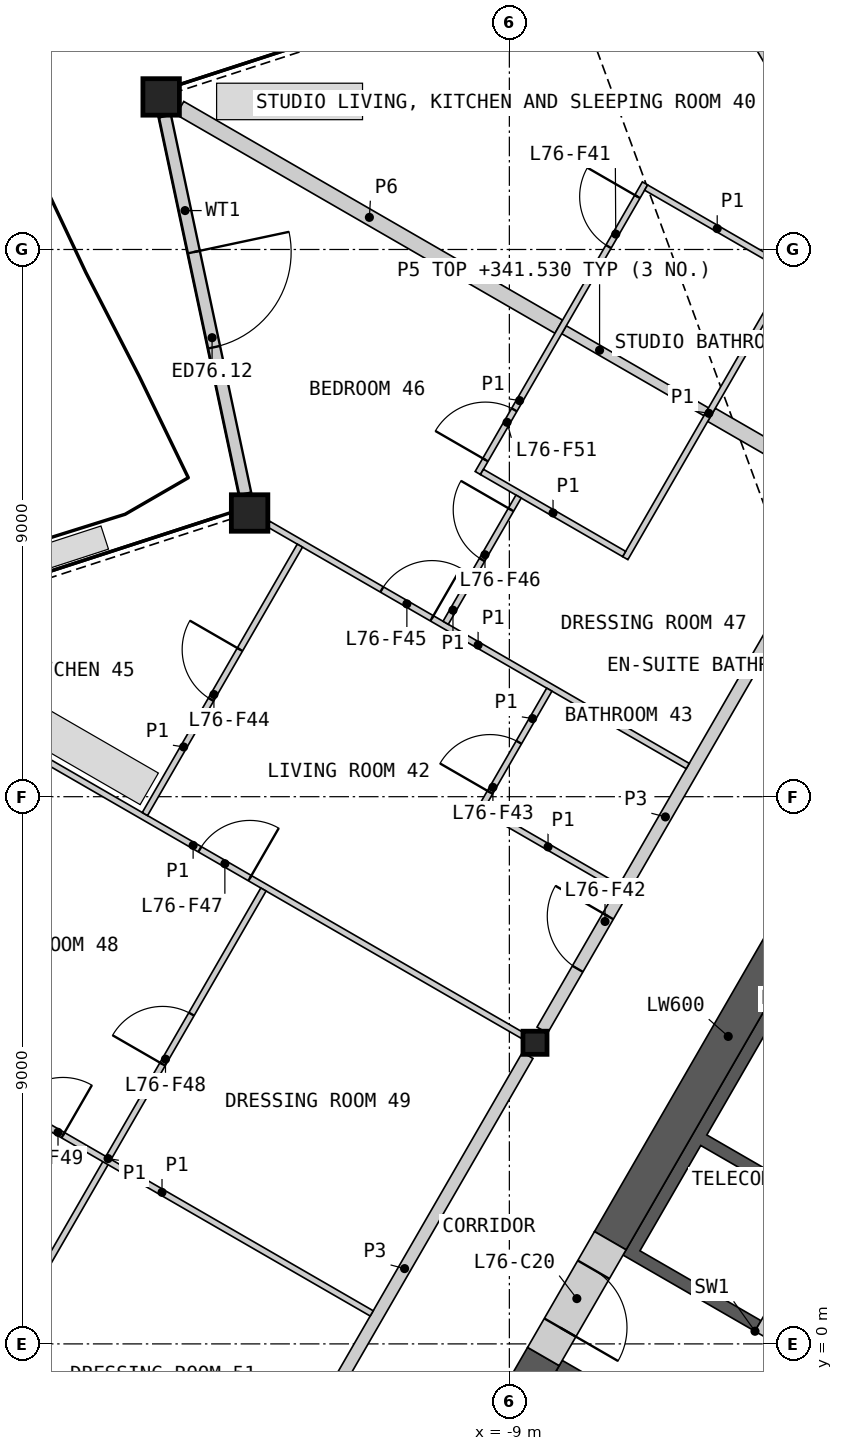
"""IFC4 building model, lengths in metres.
Left out: names, types, materials, properties, quantities, classifications, styles, units other than length and angle.
Written with IfcOpenShell. Run it as: python <this file> out.ifc"""

import sys

from ifc_helpers import new_model, si_unit, direction, frame, frame_2d, origin, origin_2d, place, context, subcontext, project, spatial, polyline, rectangle, hollow_rectangle, i_section, outline, extrude, element, fill, save


model = new_model("IFC4")
c1 = context("Model", 3, precision=1e-05, world=origin(), true_north=direction((0.0, 1.0)))
c2 = subcontext(c1, "Body", "Model", "MODEL_VIEW")
j1 = project(units=[si_unit("LENGTHUNIT", "METRE"), si_unit("PLANEANGLEUNIT", "RADIAN")], contexts=[c1])
p1 = place(None, origin())
s1 = spatial("IfcSite", under=j1, at=p1, CompositionType="ELEMENT")
p2 = place(p1, origin())
s2 = spatial("IfcBuilding", under=s1, at=p2, CompositionType="ELEMENT")
p3 = place(p2, frame((0.0, 0.0, 339.2)))
s3 = spatial("IfcBuildingStorey", under=s2, at=p3, CompositionType="ELEMENT", Elevation=339.2)
for number, where, z_axis, x_axis in (
    (1, (-14.727, 20.509, 0.0), (0.0, 0.0, 1.0), (1.0, 0.0, 0.0)),
    (2, (-13.272, 13.666, 0.0), (0.0, 0.0, 1.0), (1.0, 0.0, 0.0)),
):
    element("IfcColumn", number, at=place(p3, frame(where, z_axis=z_axis, x_axis=x_axis)), inside=s3, PredefinedType="COLUMN", context=c2, shape_type="SweptSolid", body=[
        extrude(hollow_rectangle(XDim=0.6, YDim=0.6, WallThickness=0.04, at=origin_2d()), origin(), (0.0, 0.0, 1.0), 3.4),
    ])
p4 = place(p3, frame((-8.578, 4.953, 0.0), z_axis=(0.0, 0.0, 1.0), x_axis=(1.0, 0.0, 0.0)))
e3 = element("IfcColumn", 3, at=p4, inside=s3, PredefinedType="COLUMN", context=c2, shape_type="SweptSolid", body=[
    extrude(i_section(OverallWidth=0.396, OverallDepth=0.381, WebThickness=0.019, FlangeThickness=0.03, at=origin_2d()), origin(), (0.0, 0.0, 1.0), 3.4),
])
p5 = place(p3, frame((-14.663, 20.192, 0.0), z_axis=(0.0, 0.0, 1.0), x_axis=(0.207897850695, -0.97815054244, 0.0)))
e4 = element("IfcWall", 4, at=p5, inside=s3, PredefinedType="SOLIDWALL", context=c2, shape_type="SweptSolid", body=[
    extrude(rectangle(XDim=6.348, YDim=0.2, at=frame_2d((3.174, 0.0))), origin(), (0.0, 0.0, 1.0), 2.488),
])
p6 = place(p5, frame((2.285, 0.0, 0.0)))
e5 = element("IfcOpeningElement", 5, at=p6, cuts=e4, PredefinedType="OPENING", context=c2, shape_type="SweptSolid", body=[
    extrude(rectangle(XDim=1.6, YDim=2.25, at=frame_2d((0.8, 1.125))), frame((0.0, 0.11, 0.0), z_axis=(0.0, -1.0, 0.0), x_axis=(1.0, 0.0, 0.0)), (0.0, 0.0, 1.0), 0.22),
])
p7 = place(p3, origin())
e6 = element("IfcWall", 6, at=p7, inside=s3, PredefinedType="SHEAR", context=c2, shape_type="SweptSolid", body=[
    extrude(outline(polyline([(-6.061, -1.697), (-8.231, -0.444), (-8.131, -0.271), (-5.96, -1.524), (-6.061, -1.697)])), origin(), (0.0, 0.0, 1.0), 3.1),
])
p8 = place(p3, origin())
e7 = element("IfcWall", 7, at=p8, inside=s3, PredefinedType="SHEAR", context=c2, shape_type="SweptSolid", body=[
    extrude(outline(polyline([(-4.96, 0.208), (-7.131, 1.461), (-3.731, 7.35), (-1.561, 6.097), (-1.66, 5.924), (-3.652, 7.074), (-5.752, 3.437), (-3.76, 2.287), (-3.861, 2.113), (-5.852, 3.263), (-6.852, 1.531), (-4.861, 0.381), (-4.96, 0.208)])), origin(), (0.0, 0.0, 1.0), 3.1),
])
p9 = place(p3, frame((-1.631, 5.776, 0.0), z_axis=(0.0, 0.0, 1.0), x_axis=(-0.499992876559, -0.866029516466, 0.0)))
e8 = element("IfcWall", 8, at=p9, inside=s3, PredefinedType="SOLIDWALL", context=c2, shape_type="SweptSolid", body=[
    extrude(rectangle(XDim=6.486, YDim=0.2, at=frame_2d((3.243, 0.0))), origin(), (0.0, 0.0, 1.0), 3.1),
])
p10 = place(p9, frame((1.537, 0.0, 0.0)))
e9 = element("IfcOpeningElement", 9, at=p10, cuts=e8, PredefinedType="OPENING", context=c2, shape_type="SweptSolid", body=[
    extrude(rectangle(XDim=0.9, YDim=2.1, at=frame_2d((0.45, 1.05))), frame((0.0, 0.11, 0.0), z_axis=(0.0, -1.0, 0.0), x_axis=(1.0, 0.0, 0.0)), (0.0, 0.0, 1.0), 0.22),
])
p11 = place(p9, frame((4.837, 0.0, 0.0)))
e10 = element("IfcOpeningElement", 10, at=p11, cuts=e8, PredefinedType="OPENING", context=c2, shape_type="SweptSolid", body=[
    extrude(rectangle(XDim=0.9, YDim=2.1, at=frame_2d((0.45, 1.05))), frame((0.0, 0.11, 0.0), z_axis=(0.0, -1.0, 0.0), x_axis=(1.0, 0.0, 0.0)), (0.0, 0.0, 1.0), 0.22),
])
p12 = place(p3, frame((-3.461, 8.417, 0.0), z_axis=(0.0, 0.0, 1.0), x_axis=(-0.50000391502, -0.866023143435, 0.0)))
e11 = element("IfcWall", 11, at=p12, inside=s3, PredefinedType="SHEAR", context=c2, shape_type="SweptSolid", body=[
    extrude(rectangle(XDim=7.759, YDim=0.6, at=frame_2d((3.879, 0.0))), origin(), (0.0, 0.0, 1.0), 3.1),
])
p13 = place(p3, frame((-8.44, -0.208, 0.0), z_axis=(0.0, 0.0, 1.0), x_axis=(-0.500007425856, -0.866021116422, 0.0)))
e12 = element("IfcWall", 12, at=p13, inside=s3, PredefinedType="SHEAR", context=c2, shape_type="SweptSolid", body=[
    extrude(rectangle(XDim=4.969, YDim=0.6, at=frame_2d((2.484, 0.0))), origin(), (0.0, 0.0, 1.0), 3.1),
])
p14 = place(p3, frame((-7.34, 1.698, 0.0), z_axis=(0.0, 0.0, 1.0), x_axis=(-0.50002983664, -0.866008176907, 0.0)))
e13 = element("IfcWall", 13, at=p14, inside=s3, PredefinedType="SHEAR", context=c2, shape_type="SweptSolid", body=[
    extrude(rectangle(XDim=2.2, YDim=0.6, at=frame_2d((1.1, 0.0))), origin(), (0.0, 0.0, 1.0), 3.1),
])
p15 = place(p14, frame((0.55, 0.0, 0.0)))
e14 = element("IfcOpeningElement", 14, at=p15, cuts=e13, PredefinedType="OPENING", context=c2, shape_type="SweptSolid", body=[
    extrude(rectangle(XDim=1.1, YDim=2.1, at=frame_2d((0.55, 1.05))), frame((0.0, 0.31, 0.0), z_axis=(0.0, -1.0, 0.0), x_axis=(1.0, 0.0, 0.0)), (0.0, 0.0, 1.0), 0.62),
])
p16 = place(p3, frame((-24.815, 2.323, 0.0), z_axis=(0.0, 0.0, 1.0), x_axis=(0.866033203648, -0.499986489997, 0.0)))
e15 = element("IfcWall", 15, at=p16, inside=s3, PredefinedType="PARTITIONING", context=c2, shape_type="SweptSolid", body=[
    extrude(rectangle(XDim=12.646, YDim=0.25, at=frame_2d((6.323, 0.0))), origin(), (0.0, 0.0, 1.0), 2.33),
])
p17 = place(p3, frame((-8.458, 5.16, 0.0), z_axis=(0.0, 0.0, 1.0), x_axis=(0.499984266882, 0.866034487114, 0.0)))
e16 = element("IfcWall", 16, at=p17, inside=s3, PredefinedType="PARTITIONING", context=c2, shape_type="SweptSolid", body=[
    extrude(rectangle(XDim=8.099, YDim=0.2, at=frame_2d((4.049, 0.0))), origin(), (0.0, 0.0, 1.0), 3.1),
])
p18 = place(p17, frame((1.164, 0.0, 0.0)))
e17 = element("IfcOpeningElement", 17, at=p18, cuts=e16, PredefinedType="OPENING", context=c2, shape_type="SweptSolid", body=[
    extrude(rectangle(XDim=1.0, YDim=2.1, at=frame_2d((0.5, 1.05))), frame((0.0, 0.11, 0.0), z_axis=(0.0, -1.0, 0.0), x_axis=(1.0, 0.0, 0.0)), (0.0, 0.0, 1.0), 0.22),
])
p19 = place(p3, frame((-12.748, -2.269, 0.0), z_axis=(0.0, 0.0, 1.0), x_axis=(0.499984266882, 0.866034487114, 0.0)))
e18 = element("IfcWall", 18, at=p19, inside=s3, PredefinedType="PARTITIONING", context=c2, shape_type="SweptSolid", body=[
    extrude(rectangle(XDim=8.099, YDim=0.2, at=frame_2d((4.049, 0.0))), origin(), (0.0, 0.0, 1.0), 3.1),
])
p20 = place(p3, frame((-14.417, 20.327, 0.0), z_axis=(0.0, 0.0, 1.0), x_axis=(0.866018271907, -0.50001235257, 0.0)))
e19 = element("IfcWall", 19, at=p20, inside=s3, PredefinedType="PARTITIONING", context=c2, shape_type="SweptSolid", body=[
    extrude(rectangle(XDim=7.193, YDim=0.25, at=frame_2d((3.596, 0.0))), origin(), (0.0, 0.0, 1.0), 2.33),
])
p21 = place(p3, frame((-5.676, 15.28, 0.0), z_axis=(0.0, 0.0, 1.0), x_axis=(0.865989465428, -0.500062241894, 0.0)))
e20 = element("IfcWall", 20, at=p21, inside=s3, PredefinedType="PARTITIONING", context=c2, shape_type="SweptSolid", body=[
    extrude(rectangle(XDim=2.55, YDim=0.25, at=frame_2d((1.275, 0.0))), origin(), (0.0, 0.0, 1.0), 2.33),
])
p22 = place(p3, frame((-9.292, 28.919, 0.0), z_axis=(0.0, 0.0, 1.0), x_axis=(0.505558038556, -0.862792599442, 0.0)))
e21 = element("IfcWall", 21, at=p22, inside=s3, PredefinedType="PARTITIONING", context=c2, shape_type="SweptSolid", body=[
    extrude(rectangle(XDim=14.397, YDim=0.2, at=frame_2d((7.199, 0.0))), origin(), (0.0, 0.0, 1.0), 2.33),
])
p23 = place(p3, frame((-8.101, 16.68, 0.0), z_axis=(0.0, 0.0, 1.0), x_axis=(0.866019956843, -0.50000943426, 0.0)))
e22 = element("IfcWall", 22, at=p23, inside=s3, PredefinedType="PLUMBINGWALL", context=c2, shape_type="SweptSolid", body=[
    extrude(rectangle(XDim=2.7, YDim=0.15, at=frame_2d((1.35, 0.0))), origin(), (0.0, 0.0, 1.0), 2.33),
])
p24 = place(p3, frame((-19.615, 11.325, 0.0), z_axis=(0.0, 0.0, 1.0), x_axis=(0.86602139559, -0.500006942333, 0.0)))
e23 = element("IfcWall", 23, at=p24, inside=s3, PredefinedType="PARTITIONING", context=c2, shape_type="SweptSolid", body=[
    extrude(rectangle(XDim=12.505, YDim=0.1, at=frame_2d((6.252, 0.0))), origin(), (0.0, 0.0, 1.0), 2.33),
])
p25 = place(p24, frame((6.38, 0.0, 0.0)))
e24 = element("IfcOpeningElement", 24, at=p25, cuts=e23, PredefinedType="OPENING", context=c2, shape_type="SweptSolid", body=[
    extrude(rectangle(XDim=0.95, YDim=2.1, at=frame_2d((0.475, 1.05))), frame((0.0, 0.06, 0.0), z_axis=(0.0, -1.0, 0.0), x_axis=(1.0, 0.0, 0.0)), (0.0, 0.0, 1.0), 0.12),
])
p26 = place(p3, frame((-18.154, -1.377, 0.0), z_axis=(0.0, 0.0, 1.0), x_axis=(0.49998782916, 0.866032430508, 0.0)))
e25 = element("IfcWall", 25, at=p26, inside=s3, PredefinedType="PARTITIONING", context=c2, shape_type="SweptSolid", body=[
    extrude(rectangle(XDim=10.22, YDim=0.1, at=frame_2d((5.11, 0.0))), origin(), (0.0, 0.0, 1.0), 2.33),
])
p27 = place(p26, frame((6.903, 0.0, 0.0)))
e26 = element("IfcOpeningElement", 26, at=p27, cuts=e25, PredefinedType="OPENING", context=c2, shape_type="SweptSolid", body=[
    extrude(rectangle(XDim=0.95, YDim=2.1, at=frame_2d((0.475, 1.05))), frame((0.0, 0.06, 0.0), z_axis=(0.0, -1.0, 0.0), x_axis=(1.0, 0.0, 0.0)), (0.0, 0.0, 1.0), 0.12),
])
p28 = place(p26, frame((0.552, 0.0, 0.0)))
e27 = element("IfcOpeningElement", 27, at=p28, cuts=e25, PredefinedType="OPENING", context=c2, shape_type="SweptSolid", body=[
    extrude(rectangle(XDim=0.95, YDim=2.1, at=frame_2d((0.475, 1.05))), frame((0.0, 0.06, 0.0), z_axis=(0.0, -1.0, 0.0), x_axis=(1.0, 0.0, 0.0)), (0.0, 0.0, 1.0), 0.12),
])
p29 = place(p3, frame((-18.161, 4.484, 0.0), z_axis=(0.0, 0.0, 1.0), x_axis=(0.86602732995, -0.499996663769, 0.0)))
e28 = element("IfcWall", 28, at=p29, inside=s3, PredefinedType="PARTITIONING", context=c2, shape_type="SweptSolid", body=[
    extrude(rectangle(XDim=7.964, YDim=0.1, at=frame_2d((3.982, 0.0))), origin(), (0.0, 0.0, 1.0), 2.33),
])
p30 = place(p29, frame((1.152, 0.0, 0.0)))
e29 = element("IfcOpeningElement", 29, at=p30, cuts=e28, PredefinedType="OPENING", context=c2, shape_type="SweptSolid", body=[
    extrude(rectangle(XDim=0.95, YDim=2.1, at=frame_2d((0.475, 1.05))), frame((0.0, 0.06, 0.0), z_axis=(0.0, -1.0, 0.0), x_axis=(1.0, 0.0, 0.0)), (0.0, 0.0, 1.0), 0.12),
])
p31 = place(p3, frame((-12.962, 13.485, 0.0), z_axis=(0.0, 0.0, 1.0), x_axis=(0.866021168401, -0.500007335828, 0.0)))
e30 = element("IfcWall", 30, at=p31, inside=s3, PredefinedType="PARTITIONING", context=c2, shape_type="SweptSolid", body=[
    extrude(rectangle(XDim=7.962, YDim=0.1, at=frame_2d((3.981, 0.0))), origin(), (0.0, 0.0, 1.0), 2.33),
])
p32 = place(p31, frame((2.154, 0.0, 0.0)))
e31 = element("IfcOpeningElement", 31, at=p32, cuts=e30, PredefinedType="OPENING", context=c2, shape_type="SweptSolid", body=[
    extrude(rectangle(XDim=0.95, YDim=2.1, at=frame_2d((0.475, 1.05))), frame((0.0, 0.06, 0.0), z_axis=(0.0, -1.0, 0.0), x_axis=(1.0, 0.0, 0.0)), (0.0, 0.0, 1.0), 0.12),
])
p33 = place(p3, frame((-7.094, 12.924, 0.0), z_axis=(0.0, 0.0, 1.0), x_axis=(0.499996545922, 0.866027397988, 0.0)))
e32 = element("IfcWall", 32, at=p33, inside=s3, PredefinedType="PARTITIONING", context=c2, shape_type="SweptSolid", body=[
    extrude(rectangle(XDim=5.5, YDim=0.1, at=frame_2d((2.75, 0.0))), origin(), (0.0, 0.0, 1.0), 2.33),
])
p34 = place(p3, frame((-9.519, 14.323, 0.0), z_axis=(0.0, 0.0, 1.0), x_axis=(0.499996545922, 0.866027397988, 0.0)))
e33 = element("IfcWall", 33, at=p34, inside=s3, PredefinedType="PARTITIONING", context=c2, shape_type="SweptSolid", body=[
    extrude(rectangle(XDim=5.5, YDim=0.1, at=frame_2d((2.75, 0.0))), origin(), (0.0, 0.0, 1.0), 2.33),
])
p35 = place(p34, frame((4.3, 0.0, 0.0)))
e34 = element("IfcOpeningElement", 34, at=p35, cuts=e33, PredefinedType="OPENING", context=c2, shape_type="SweptSolid", body=[
    extrude(rectangle(XDim=0.95, YDim=2.1, at=frame_2d((0.475, 1.05))), frame((0.0, 0.06, 0.0), z_axis=(0.0, -1.0, 0.0), x_axis=(1.0, 0.0, 0.0)), (0.0, 0.0, 1.0), 0.12),
])
p36 = place(p34, frame((0.25, 0.0, 0.0)))
e35 = element("IfcOpeningElement", 35, at=p36, cuts=e33, PredefinedType="OPENING", context=c2, shape_type="SweptSolid", body=[
    extrude(rectangle(XDim=0.95, YDim=2.1, at=frame_2d((0.475, 1.05))), frame((0.0, 0.06, 0.0), z_axis=(0.0, -1.0, 0.0), x_axis=(1.0, 0.0, 0.0)), (0.0, 0.0, 1.0), 0.12),
])
p37 = place(p3, frame((-14.994, 8.714, 0.0), z_axis=(0.0, 0.0, 1.0), x_axis=(0.500012659481, 0.866018094706, 0.0)))
e36 = element("IfcWall", 36, at=p37, inside=s3, PredefinedType="PARTITIONING", context=c2, shape_type="SweptSolid", body=[
    extrude(rectangle(XDim=5.097, YDim=0.1, at=frame_2d((2.549, 0.0))), origin(), (0.0, 0.0, 1.0), 2.33),
])
p38 = place(p37, frame((2.175, 0.0, 0.0)))
e37 = element("IfcOpeningElement", 37, at=p38, cuts=e36, PredefinedType="OPENING", context=c2, shape_type="SweptSolid", body=[
    extrude(rectangle(XDim=0.95, YDim=2.1, at=frame_2d((0.475, 1.05))), frame((0.0, 0.06, 0.0), z_axis=(0.0, -1.0, 0.0), x_axis=(1.0, 0.0, 0.0)), (0.0, 0.0, 1.0), 0.12),
])
for number, where, z_axis, x_axis in (
    (38, (-9.451, 14.342, 0.0), (0.0, 0.0, 1.0), (0.866, -0.5, 0.0)),
    (39, (-6.751, 19.018, 0.0), (0.0, 0.0, 1.0), (0.866, -0.5, 0.0)),
):
    element("IfcWall", number, at=place(p3, frame(where, z_axis=z_axis, x_axis=x_axis)), inside=s3, PredefinedType="PARTITIONING", context=c2, shape_type="SweptSolid", body=[
        extrude(rectangle(XDim=2.7, YDim=0.1, at=frame_2d((1.35, 0.0))), origin(), (0.0, 0.0, 1.0), 2.33),
    ])
p39 = place(p3, frame((-9.511, 8.837, 0.0), z_axis=(0.0, 0.0, 1.0), x_axis=(0.866029095148, -0.499993606316, 0.0)))
e40 = element("IfcWall", 40, at=p39, inside=s3, PredefinedType="PARTITIONING", context=c2, shape_type="SweptSolid", body=[
    extrude(rectangle(XDim=2.65, YDim=0.1, at=frame_2d((1.325, 0.0))), origin(), (0.0, 0.0, 1.0), 2.33),
])
p40 = place(p3, frame((-10.047, 11.86, 0.0), z_axis=(0.0, 0.0, 1.0), x_axis=(0.500092661743, 0.865971898892, 0.0)))
e41 = element("IfcWall", 41, at=p40, inside=s3, PredefinedType="PARTITIONING", context=c2, shape_type="SweptSolid", body=[
    extrude(rectangle(XDim=2.397, YDim=0.1, at=frame_2d((1.199, 0.0))), origin(), (0.0, 0.0, 1.0), 2.33),
])
p41 = place(p40, frame((1.198, 0.0, 0.0)))
e42 = element("IfcOpeningElement", 42, at=p41, cuts=e41, PredefinedType="OPENING", context=c2, shape_type="SweptSolid", body=[
    extrude(rectangle(XDim=0.95, YDim=2.1, at=frame_2d((0.475, 1.05))), frame((0.0, 0.06, 0.0), z_axis=(0.0, -1.0, 0.0), x_axis=(1.0, 0.0, 0.0)), (0.0, 0.0, 1.0), 0.12),
])
p42 = place(p3, frame((-9.443, 8.855, 0.0), z_axis=(0.0, 0.0, 1.0), x_axis=(0.50002983664, 0.866008176907, 0.0)))
e43 = element("IfcWall", 43, at=p42, inside=s3, PredefinedType="PARTITIONING", context=c2, shape_type="SweptSolid", body=[
    extrude(rectangle(XDim=2.2, YDim=0.1, at=frame_2d((1.1, 0.0))), origin(), (0.0, 0.0, 1.0), 2.33),
])
p43 = place(p42, frame((0.25, 0.0, 0.0)))
e44 = element("IfcOpeningElement", 44, at=p43, cuts=e43, PredefinedType="OPENING", context=c2, shape_type="SweptSolid", body=[
    extrude(rectangle(XDim=0.95, YDim=2.1, at=frame_2d((0.475, 1.05))), frame((0.0, 0.06, 0.0), z_axis=(0.0, -1.0, 0.0), x_axis=(1.0, 0.0, 0.0)), (0.0, 0.0, 1.0), 0.12),
])
p44 = place(p6, origin())
e45 = element("IfcDoor", 45, at=p44, inside=s3, OperationType="DOUBLE_DOOR_SINGLE_SWING", PredefinedType="DOOR", context=c2, shape_type="SweptSolid", body=[
    extrude(rectangle(XDim=1.6, YDim=2.25, at=frame_2d((0.8, 1.125))), frame((0.0, 0.025, 0.0), z_axis=(0.0, -1.0, 0.0), x_axis=(1.0, 0.0, 0.0)), (0.0, 0.0, 1.0), 0.05),
])
fill(e5, e45)
p45 = place(p15, origin())
e46 = element("IfcDoor", 46, at=p45, inside=s3, OperationType="SINGLE_SWING_RIGHT", PredefinedType="DOOR", context=c2, shape_type="SweptSolid", body=[
    extrude(rectangle(XDim=1.1, YDim=2.1, at=frame_2d((0.55, 1.05))), frame((0.0, 0.055, 0.0), z_axis=(0.0, -1.0, 0.0), x_axis=(1.0, 0.0, 0.0)), (0.0, 0.0, 1.0), 0.05),
])
fill(e14, e46)
p46 = place(p35, origin())
e47 = element("IfcDoor", 47, at=p46, inside=s3, OperationType="SINGLE_SWING_RIGHT", PredefinedType="DOOR", context=c2, shape_type="SweptSolid", body=[
    extrude(rectangle(XDim=0.95, YDim=2.1, at=frame_2d((0.475, 1.05))), frame((0.0, 0.025, 0.0), z_axis=(0.0, -1.0, 0.0), x_axis=(1.0, 0.0, 0.0)), (0.0, 0.0, 1.0), 0.05),
])
fill(e34, e47)
p47 = place(p18, origin())
e48 = element("IfcDoor", 48, at=p47, inside=s3, OperationType="SINGLE_SWING_RIGHT", PredefinedType="DOOR", context=c2, shape_type="SweptSolid", body=[
    extrude(rectangle(XDim=1.0, YDim=2.1, at=frame_2d((0.5, 1.05))), frame((0.0, 0.025, 0.0), z_axis=(0.0, -1.0, 0.0), x_axis=(1.0, 0.0, 0.0)), (0.0, 0.0, 1.0), 0.05),
])
fill(e17, e48)
p48 = place(p43, origin())
e49 = element("IfcDoor", 49, at=p48, inside=s3, OperationType="SINGLE_SWING_LEFT", PredefinedType="DOOR", context=c2, shape_type="SweptSolid", body=[
    extrude(rectangle(XDim=0.95, YDim=2.1, at=frame_2d((0.475, 1.05))), frame((0.0, 0.025, 0.0), z_axis=(0.0, -1.0, 0.0), x_axis=(1.0, 0.0, 0.0)), (0.0, 0.0, 1.0), 0.05),
])
fill(e44, e49)
p49 = place(p38, origin())
e50 = element("IfcDoor", 50, at=p49, inside=s3, OperationType="SINGLE_SWING_RIGHT", PredefinedType="DOOR", context=c2, shape_type="SweptSolid", body=[
    extrude(rectangle(XDim=0.95, YDim=2.1, at=frame_2d((0.475, 1.05))), frame((0.0, 0.025, 0.0), z_axis=(0.0, -1.0, 0.0), x_axis=(1.0, 0.0, 0.0)), (0.0, 0.0, 1.0), 0.05),
])
fill(e37, e50)
p50 = place(p32, origin())
e51 = element("IfcDoor", 51, at=p50, inside=s3, OperationType="SINGLE_SWING_RIGHT", PredefinedType="DOOR", context=c2, shape_type="SweptSolid", body=[
    extrude(rectangle(XDim=0.95, YDim=2.1, at=frame_2d((0.475, 1.05))), frame((0.0, 0.025, 0.0), z_axis=(0.0, -1.0, 0.0), x_axis=(1.0, 0.0, 0.0)), (0.0, 0.0, 1.0), 0.05),
])
fill(e31, e51)
p51 = place(p41, origin())
e52 = element("IfcDoor", 52, at=p51, inside=s3, OperationType="SINGLE_SWING_RIGHT", PredefinedType="DOOR", context=c2, shape_type="SweptSolid", body=[
    extrude(rectangle(XDim=0.95, YDim=2.1, at=frame_2d((0.475, 1.05))), frame((0.0, 0.025, 0.0), z_axis=(0.0, -1.0, 0.0), x_axis=(1.0, 0.0, 0.0)), (0.0, 0.0, 1.0), 0.05),
])
fill(e42, e52)
p52 = place(p25, origin())
e53 = element("IfcDoor", 53, at=p52, inside=s3, OperationType="SINGLE_SWING_RIGHT", PredefinedType="DOOR", context=c2, shape_type="SweptSolid", body=[
    extrude(rectangle(XDim=0.95, YDim=2.1, at=frame_2d((0.475, 1.05))), frame((0.0, 0.025, 0.0), z_axis=(0.0, -1.0, 0.0), x_axis=(1.0, 0.0, 0.0)), (0.0, 0.0, 1.0), 0.05),
])
fill(e24, e53)
p53 = place(p27, origin())
e54 = element("IfcDoor", 54, at=p53, inside=s3, OperationType="SINGLE_SWING_LEFT", PredefinedType="DOOR", context=c2, shape_type="SweptSolid", body=[
    extrude(rectangle(XDim=0.95, YDim=2.1, at=frame_2d((0.475, 1.05))), frame((0.0, 0.025, 0.0), z_axis=(0.0, -1.0, 0.0), x_axis=(1.0, 0.0, 0.0)), (0.0, 0.0, 1.0), 0.05),
])
fill(e26, e54)
p54 = place(p30, origin())
e55 = element("IfcDoor", 55, at=p54, inside=s3, OperationType="SINGLE_SWING_RIGHT", PredefinedType="DOOR", context=c2, shape_type="SweptSolid", body=[
    extrude(rectangle(XDim=0.95, YDim=2.1, at=frame_2d((0.475, 1.05))), frame((0.0, 0.025, 0.0), z_axis=(0.0, -1.0, 0.0), x_axis=(1.0, 0.0, 0.0)), (0.0, 0.0, 1.0), 0.05),
])
fill(e29, e55)
p55 = place(p36, origin())
e56 = element("IfcDoor", 56, at=p55, inside=s3, OperationType="SINGLE_SWING_LEFT", PredefinedType="DOOR", context=c2, shape_type="SweptSolid", body=[
    extrude(rectangle(XDim=0.95, YDim=2.1, at=frame_2d((0.475, 1.05))), frame((0.0, 0.025, 0.0), z_axis=(0.0, -1.0, 0.0), x_axis=(1.0, 0.0, 0.0)), (0.0, 0.0, 1.0), 0.05),
])
fill(e35, e56)
save(model, sys.argv[1])
